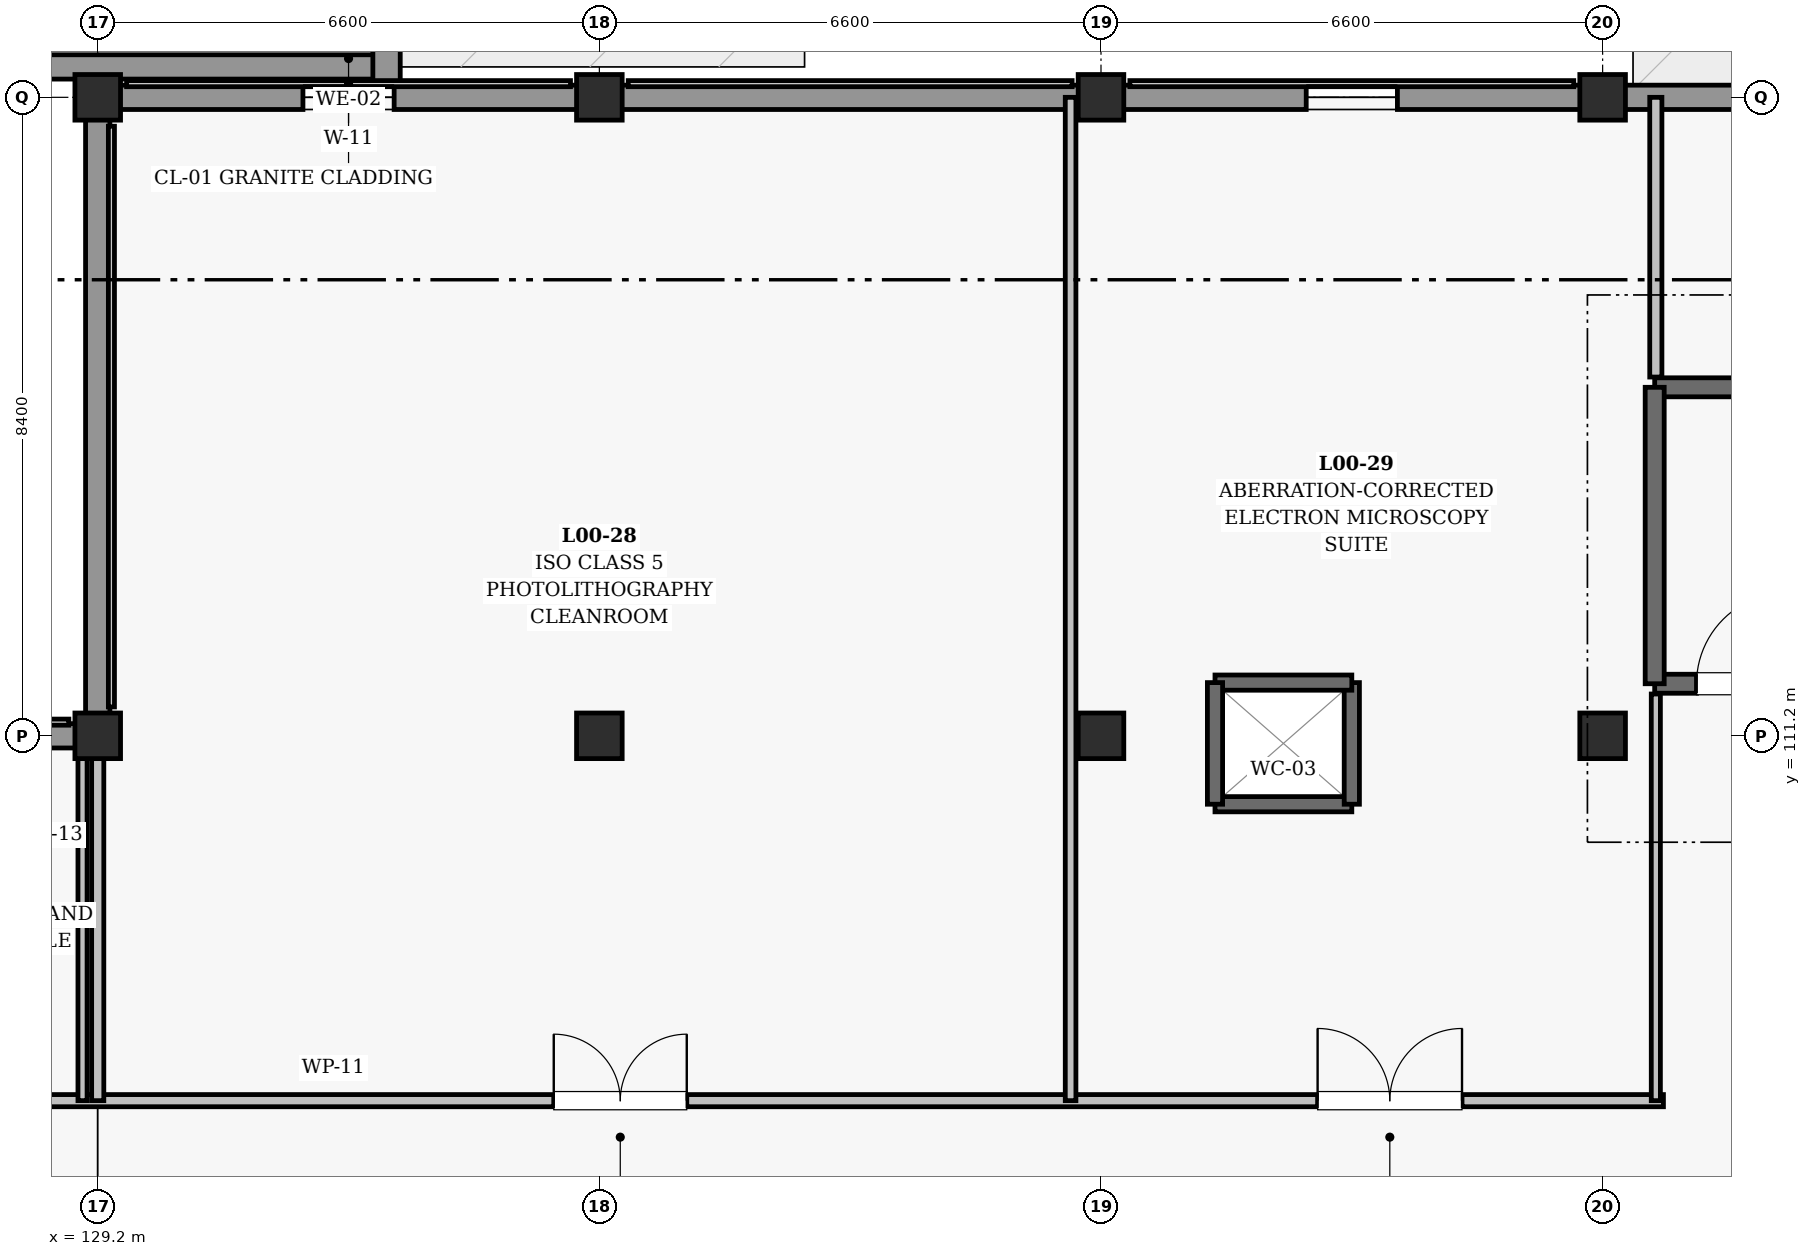
"""IFC4 building model, lengths in metres.
Left out: names, types, materials, properties, quantities, classifications, styles, units other than length and angle.
Written with IfcOpenShell. Run it as: python <this file> out.ifc"""

import sys

from ifc_helpers import new_model, si_unit, direction, frame, frame_2d, origin, origin_2d, place, context, subcontext, project, spatial, rectangle, extrude, element, fill, save


model = new_model("IFC4")
c1 = context("Model", 3, precision=1e-05, world=origin(), true_north=direction((0.0, 1.0)))
c2 = subcontext(c1, "Body", "Model", "MODEL_VIEW")
j1 = project(units=[si_unit("LENGTHUNIT", "METRE"), si_unit("PLANEANGLEUNIT", "RADIAN")], contexts=[c1])
p1 = place(None, origin())
s1 = spatial("IfcSite", under=j1, at=p1, CompositionType="ELEMENT")
p2 = place(p1, origin())
s2 = spatial("IfcBuilding", under=s1, at=p2, CompositionType="ELEMENT")
p3 = place(p2, origin())
s3 = spatial("IfcBuildingStorey", under=s2, at=p3, CompositionType="ELEMENT", Elevation=0.0)
for number, where, z_axis, x_axis in (
    (1, (129.2, 111.2, 0.0), (0.0, 0.0, 1.0), (1.0, 0.0, 0.0)),
    (2, (129.2, 119.6, 0.0), (0.0, 0.0, 1.0), (1.0, 0.0, 0.0)),
    (3, (135.8, 111.2, 0.0), (0.0, 0.0, 1.0), (1.0, 0.0, 0.0)),
    (4, (135.8, 119.6, 0.0), (0.0, 0.0, 1.0), (1.0, 0.0, 0.0)),
    (5, (142.4, 111.2, 0.0), (0.0, 0.0, 1.0), (1.0, 0.0, 0.0)),
    (6, (142.4, 119.6, 0.0), (0.0, 0.0, 1.0), (1.0, 0.0, 0.0)),
    (7, (149.0, 111.2, 0.0), (0.0, 0.0, 1.0), (1.0, 0.0, 0.0)),
    (8, (149.0, 119.6, 0.0), (0.0, 0.0, 1.0), (1.0, 0.0, 0.0)),
):
    element("IfcColumn", number, at=place(p3, frame(where, z_axis=z_axis, x_axis=x_axis)), inside=s3, PredefinedType="COLUMN", context=c2, shape_type="SweptSolid", body=[
        extrude(rectangle(XDim=0.6, YDim=0.6, at=origin_2d()), origin(), (0.0, 0.0, 1.0), 5.4),
    ])
p4 = place(p3, frame((114.8, 120.0, 0.0), z_axis=(0.0, 0.0, 1.0), x_axis=(1.0, 0.0, 0.0)))
e9 = element("IfcWall", 9, at=p4, inside=s3, PredefinedType="SOLIDWALL", context=c2, shape_type="SweptSolid", body=[
    extrude(rectangle(XDim=18.2, YDim=0.32, at=frame_2d((9.1, 0.0))), origin(), (0.0, 0.0, 1.0), 4.2),
])
p5 = place(p3, frame((133.0, 119.8, 0.0), z_axis=(0.0, 0.0, 1.0), x_axis=(0.0, 1.0, 0.0)))
e10 = element("IfcWall", 10, at=p5, inside=s3, PredefinedType="SOLIDWALL", context=c2, shape_type="SweptSolid", body=[
    extrude(rectangle(XDim=7.4, YDim=0.36, at=frame_2d((3.7, 0.0))), origin(), (0.0, 0.0, 1.0), 4.2),
])
p6 = place(p5, frame((0.6, 0.0, 0.0)))
e11 = element("IfcOpeningElement", 11, at=p6, cuts=e10, PredefinedType="OPENING", context=c2, shape_type="SweptSolid", body=[
    extrude(rectangle(XDim=6.2, YDim=3.2, at=frame_2d((3.1, 1.6))), frame((0.0, 0.19, 0.0), z_axis=(0.0, -1.0, 0.0), x_axis=(1.0, 0.0, 0.0)), (0.0, 0.0, 1.0), 0.38),
])
p7 = place(p3, frame((122.255, 111.2, 0.0), z_axis=(0.0, 0.0, 1.0), x_axis=(1.0, 0.0, 0.0)))
e12 = element("IfcWall", 12, at=p7, inside=s3, PredefinedType="SOLIDWALL", context=c2, shape_type="SweptSolid", body=[
    extrude(rectangle(XDim=6.665, YDim=0.32, at=frame_2d((3.333, 0.0))), origin(), (0.0, 0.0, 1.0), 4.165),
])
p8 = place(p7, frame((2.583, 0.0, 1.85)))
e13 = element("IfcOpeningElement", 13, at=p8, cuts=e12, PredefinedType="OPENING", context=c2, shape_type="SweptSolid", body=[
    extrude(rectangle(XDim=1.5, YDim=1.1, at=frame_2d((0.75, 0.55))), frame((0.0, 0.17, 0.0), z_axis=(0.0, -1.0, 0.0), x_axis=(1.0, 0.0, 0.0)), (0.0, 0.0, 1.0), 0.34),
])
p9 = place(p3, frame((129.48, 119.6, 0.0), z_axis=(0.0, 0.0, 1.0), x_axis=(1.0, 0.0, 0.0)))
e14 = element("IfcWall", 14, at=p9, inside=s3, PredefinedType="SOLIDWALL", context=c2, shape_type="SweptSolid", body=[
    extrude(rectangle(XDim=6.04, YDim=0.32, at=frame_2d((3.02, 0.0))), origin(), (0.0, 0.0, 1.0), 4.215),
])
p10 = place(p9, frame((2.42, 0.0, 1.85)))
e15 = element("IfcOpeningElement", 15, at=p10, cuts=e14, PredefinedType="OPENING", context=c2, shape_type="SweptSolid", body=[
    extrude(rectangle(XDim=1.2, YDim=1.1, at=frame_2d((0.6, 0.55))), frame((0.0, 0.17, 0.0), z_axis=(0.0, -1.0, 0.0), x_axis=(1.0, 0.0, 0.0)), (0.0, 0.0, 1.0), 0.34),
])
p11 = place(p3, frame((136.08, 119.6, 0.0), z_axis=(0.0, 0.0, 1.0), x_axis=(1.0, 0.0, 0.0)))
e16 = element("IfcWall", 16, at=p11, inside=s3, PredefinedType="SOLIDWALL", context=c2, shape_type="SweptSolid", body=[
    extrude(rectangle(XDim=6.04, YDim=0.32, at=frame_2d((3.02, 0.0))), origin(), (0.0, 0.0, 1.0), 3.815),
])
p12 = place(p3, frame((142.68, 119.6, 0.0), z_axis=(0.0, 0.0, 1.0), x_axis=(1.0, 0.0, 0.0)))
e17 = element("IfcWall", 17, at=p12, inside=s3, PredefinedType="SOLIDWALL", context=c2, shape_type="SweptSolid", body=[
    extrude(rectangle(XDim=6.04, YDim=0.32, at=frame_2d((3.02, 0.0))), origin(), (0.0, 0.0, 1.0), 3.815),
])
p13 = place(p12, frame((2.42, 0.0, 1.85)))
e18 = element("IfcOpeningElement", 18, at=p13, cuts=e17, PredefinedType="OPENING", context=c2, shape_type="SweptSolid", body=[
    extrude(rectangle(XDim=1.2, YDim=1.1, at=frame_2d((0.6, 0.55))), frame((0.0, 0.17, 0.0), z_axis=(0.0, -1.0, 0.0), x_axis=(1.0, 0.0, 0.0)), (0.0, 0.0, 1.0), 0.34),
])
p14 = place(p3, frame((149.28, 119.6, 0.0), z_axis=(0.0, 0.0, 1.0), x_axis=(1.0, 0.0, 0.0)))
e19 = element("IfcWall", 19, at=p14, inside=s3, PredefinedType="SOLIDWALL", context=c2, shape_type="SweptSolid", body=[
    extrude(rectangle(XDim=6.04, YDim=0.32, at=frame_2d((3.02, 0.0))), origin(), (0.0, 0.0, 1.0), 4.215),
])
p15 = place(p14, frame((2.12, 0.0, 0.0)))
e20 = element("IfcOpeningElement", 20, at=p15, cuts=e19, PredefinedType="OPENING", context=c2, shape_type="SweptSolid", body=[
    extrude(rectangle(XDim=1.8, YDim=2.25, at=frame_2d((0.9, 1.125))), frame((0.0, 0.17, 0.0), z_axis=(0.0, -1.0, 0.0), x_axis=(1.0, 0.0, 0.0)), (0.0, 0.0, 1.0), 0.34),
])
p16 = place(p3, frame((129.2, 111.48, 0.0), z_axis=(0.0, 0.0, 1.0), x_axis=(0.0, 1.0, 0.0)))
e21 = element("IfcWall", 21, at=p16, inside=s3, PredefinedType="SOLIDWALL", context=c2, shape_type="SweptSolid", body=[
    extrude(rectangle(XDim=7.84, YDim=0.32, at=frame_2d((3.92, 0.0))), origin(), (0.0, 0.0, 1.0), 4.215),
])
p17 = place(p3, frame((149.685, 111.885, 0.0), z_axis=(0.0, 0.0, 1.0), x_axis=(1.0, 0.0, 0.0)))
e22 = element("IfcWall", 22, at=p17, inside=s3, PredefinedType="SHEAR", context=c2, shape_type="SweptSolid", body=[
    extrude(rectangle(XDim=10.63, YDim=0.25, at=frame_2d((5.315, 0.0))), origin(), (0.0, 0.0, 1.0), 5.035),
])
p18 = place(p17, frame((0.55, 0.0, 0.0)))
e23 = element("IfcOpeningElement", 23, at=p18, cuts=e22, PredefinedType="OPENING", context=c2, shape_type="SweptSolid", body=[
    extrude(rectangle(XDim=1.2, YDim=2.15, at=frame_2d((0.6, 1.075))), frame((0.0, 0.135, 0.0), z_axis=(0.0, -1.0, 0.0), x_axis=(1.0, 0.0, 0.0)), (0.0, 0.0, 1.0), 0.27),
])
p19 = place(p3, frame((160.315, 115.785, 0.0), z_axis=(0.0, 0.0, 1.0), x_axis=(-1.0, 0.0, 0.0)))
e24 = element("IfcWall", 24, at=p19, inside=s3, PredefinedType="SHEAR", context=c2, shape_type="SweptSolid", body=[
    extrude(rectangle(XDim=10.63, YDim=0.25, at=frame_2d((5.315, 0.0))), origin(), (0.0, 0.0, 1.0), 5.035),
])
p20 = place(p3, frame((149.685, 115.785, 0.0), z_axis=(0.0, 0.0, 1.0), x_axis=(0.0, -1.0, 0.0)))
e25 = element("IfcWall", 25, at=p20, inside=s3, PredefinedType="SHEAR", context=c2, shape_type="SweptSolid", body=[
    extrude(rectangle(XDim=3.9, YDim=0.25, at=frame_2d((1.95, 0.0))), origin(), (0.0, 0.0, 1.0), 5.035),
])
p21 = place(p3, frame((143.9, 110.3, 0.0), z_axis=(0.0, 0.0, 1.0), x_axis=(1.0, 0.0, 0.0)))
e26 = element("IfcWall", 26, at=p21, inside=s3, PredefinedType="SHEAR", context=c2, shape_type="SweptSolid", body=[
    extrude(rectangle(XDim=1.8, YDim=0.2, at=frame_2d((0.9, 0.0))), origin(), (0.0, 0.0, 1.0), 5.04),
])
p22 = place(p3, frame((145.7, 110.3, 0.0), z_axis=(0.0, 0.0, 1.0), x_axis=(0.0, 1.0, 0.0)))
e27 = element("IfcWall", 27, at=p22, inside=s3, PredefinedType="SHEAR", context=c2, shape_type="SweptSolid", body=[
    extrude(rectangle(XDim=1.6, YDim=0.2, at=frame_2d((0.8, 0.0))), origin(), (0.0, 0.0, 1.0), 5.04),
])
p23 = place(p3, frame((145.7, 111.9, 0.0), z_axis=(0.0, 0.0, 1.0), x_axis=(-1.0, 0.0, 0.0)))
e28 = element("IfcWall", 28, at=p23, inside=s3, PredefinedType="SHEAR", context=c2, shape_type="SweptSolid", body=[
    extrude(rectangle(XDim=1.8, YDim=0.2, at=frame_2d((0.9, 0.0))), origin(), (0.0, 0.0, 1.0), 5.04),
])
p24 = place(p3, frame((143.9, 111.9, 0.0), z_axis=(0.0, 0.0, 1.0), x_axis=(0.0, -1.0, 0.0)))
e29 = element("IfcWall", 29, at=p24, inside=s3, PredefinedType="SHEAR", context=c2, shape_type="SweptSolid", body=[
    extrude(rectangle(XDim=1.6, YDim=0.2, at=frame_2d((0.8, 0.0))), origin(), (0.0, 0.0, 1.0), 5.04),
])
p25 = place(p3, frame((114.8, 106.4, 0.0), z_axis=(0.0, 0.0, 1.0), x_axis=(1.0, 0.0, 0.0)))
e30 = element("IfcWall", 30, at=p25, inside=s3, PredefinedType="PARTITIONING", context=c2, shape_type="SweptSolid", body=[
    extrude(rectangle(XDim=35.0, YDim=0.16, at=frame_2d((17.5, 0.0))), origin(), (0.0, 0.0, 1.0), 3.82),
])
p26 = place(p25, frame((6.7, 0.0, 0.0)))
e31 = element("IfcOpeningElement", 31, at=p26, cuts=e30, PredefinedType="OPENING", context=c2, shape_type="SweptSolid", body=[
    extrude(rectangle(XDim=1.1, YDim=2.15, at=frame_2d((0.55, 1.075))), frame((0.0, 0.09, 0.0), z_axis=(0.0, -1.0, 0.0), x_axis=(1.0, 0.0, 0.0)), (0.0, 0.0, 1.0), 0.18),
])
p27 = place(p25, frame((20.4, 0.0, 0.0)))
e32 = element("IfcOpeningElement", 32, at=p27, cuts=e30, PredefinedType="OPENING", context=c2, shape_type="SweptSolid", body=[
    extrude(rectangle(XDim=1.75, YDim=2.25, at=frame_2d((0.875, 1.125))), frame((0.0, 0.09, 0.0), z_axis=(0.0, -1.0, 0.0), x_axis=(1.0, 0.0, 0.0)), (0.0, 0.0, 1.0), 0.18),
])
p28 = place(p25, frame((30.45, 0.0, 0.0)))
e33 = element("IfcOpeningElement", 33, at=p28, cuts=e30, PredefinedType="OPENING", context=c2, shape_type="SweptSolid", body=[
    extrude(rectangle(XDim=1.9, YDim=2.3, at=frame_2d((0.95, 1.15))), frame((0.0, 0.09, 0.0), z_axis=(0.0, -1.0, 0.0), x_axis=(1.0, 0.0, 0.0)), (0.0, 0.0, 1.0), 0.18),
])
p29 = place(p3, frame((129.0, 106.4, 0.0), z_axis=(0.0, 0.0, 1.0), x_axis=(0.0, 1.0, 0.0)))
e34 = element("IfcWall", 34, at=p29, inside=s3, PredefinedType="PARTITIONING", context=c2, shape_type="SweptSolid", body=[
    extrude(rectangle(XDim=4.8, YDim=0.12, at=frame_2d((2.4, 0.0))), origin(), (0.0, 0.0, 1.0), 4.22),
])
p30 = place(p3, frame((129.2, 106.4, 0.0), z_axis=(0.0, 0.0, 1.0), x_axis=(0.0, 1.0, 0.0)))
e35 = element("IfcWall", 35, at=p30, inside=s3, PredefinedType="PARTITIONING", context=c2, shape_type="SweptSolid", body=[
    extrude(rectangle(XDim=4.8, YDim=0.16, at=frame_2d((2.4, 0.0))), origin(), (0.0, 0.0, 1.0), 4.22),
])
p31 = place(p3, frame((142.0, 106.4, 0.0), z_axis=(0.0, 0.0, 1.0), x_axis=(0.0, 1.0, 0.0)))
e36 = element("IfcWall", 36, at=p31, inside=s3, PredefinedType="PARTITIONING", context=c2, shape_type="SweptSolid", body=[
    extrude(rectangle(XDim=13.2, YDim=0.14, at=frame_2d((6.6, 0.0))), origin(), (0.0, 0.0, 1.0), 3.82),
])
p32 = place(p3, frame((149.7, 106.4, 0.0), z_axis=(0.0, 0.0, 1.0), x_axis=(0.0, 1.0, 0.0)))
e37 = element("IfcWall", 37, at=p32, inside=s3, PredefinedType="PARTITIONING", context=c2, shape_type="SweptSolid", body=[
    extrude(rectangle(XDim=5.35, YDim=0.12, at=frame_2d((2.675, 0.0))), origin(), (0.0, 0.0, 1.0), 4.62),
])
p33 = place(p3, frame((149.7, 115.92, 0.0), z_axis=(0.0, 0.0, 1.0), x_axis=(0.0, 1.0, 0.0)))
e38 = element("IfcWall", 38, at=p33, inside=s3, PredefinedType="PARTITIONING", context=c2, shape_type="SweptSolid", body=[
    extrude(rectangle(XDim=3.68, YDim=0.16, at=frame_2d((1.84, 0.0))), origin(), (0.0, 0.0, 1.0), 4.57),
])
p34 = place(p10, origin())
e39 = element("IfcWindow", 39, at=p34, inside=s3, PartitioningType="SINGLE_PANEL", PredefinedType="WINDOW", context=c2, shape_type="SweptSolid", body=[
    extrude(rectangle(XDim=1.2, YDim=1.1, at=frame_2d((0.6, 0.55))), frame((0.0, 0.03, 0.0), z_axis=(0.0, -1.0, 0.0), x_axis=(1.0, 0.0, 0.0)), (0.0, 0.0, 1.0), 0.06),
])
fill(e15, e39)
p35 = place(p13, origin())
e40 = element("IfcWindow", 40, at=p35, inside=s3, PartitioningType="SINGLE_PANEL", PredefinedType="WINDOW", context=c2, shape_type="SweptSolid", body=[
    extrude(rectangle(XDim=1.2, YDim=1.1, at=frame_2d((0.6, 0.55))), frame((0.0, 0.03, 0.0), z_axis=(0.0, -1.0, 0.0), x_axis=(1.0, 0.0, 0.0)), (0.0, 0.0, 1.0), 0.06),
])
fill(e18, e40)
p36 = place(p18, origin())
e41 = element("IfcDoor", 41, at=p36, inside=s3, OperationType="SINGLE_SWING_RIGHT", PredefinedType="DOOR", context=c2, shape_type="SweptSolid", body=[
    extrude(rectangle(XDim=1.2, YDim=2.15, at=frame_2d((0.6, 1.075))), frame((0.0, 0.025, 0.0), z_axis=(0.0, -1.0, 0.0), x_axis=(1.0, 0.0, 0.0)), (0.0, 0.0, 1.0), 0.05),
])
fill(e23, e41)
p37 = place(p27, origin())
e42 = element("IfcDoor", 42, at=p37, inside=s3, OperationType="DOUBLE_DOOR_SINGLE_SWING", PredefinedType="DOOR", context=c2, shape_type="SweptSolid", body=[
    extrude(rectangle(XDim=1.75, YDim=2.25, at=frame_2d((0.875, 1.125))), frame((0.0, 0.025, 0.0), z_axis=(0.0, -1.0, 0.0), x_axis=(1.0, 0.0, 0.0)), (0.0, 0.0, 1.0), 0.05),
])
fill(e32, e42)
p38 = place(p28, origin())
e43 = element("IfcDoor", 43, at=p38, inside=s3, OperationType="DOUBLE_DOOR_SINGLE_SWING", PredefinedType="DOOR", context=c2, shape_type="SweptSolid", body=[
    extrude(rectangle(XDim=1.9, YDim=2.3, at=frame_2d((0.95, 1.15))), frame((0.0, 0.025, 0.0), z_axis=(0.0, -1.0, 0.0), x_axis=(1.0, 0.0, 0.0)), (0.0, 0.0, 1.0), 0.05),
])
fill(e33, e43)
save(model, sys.argv[1])
